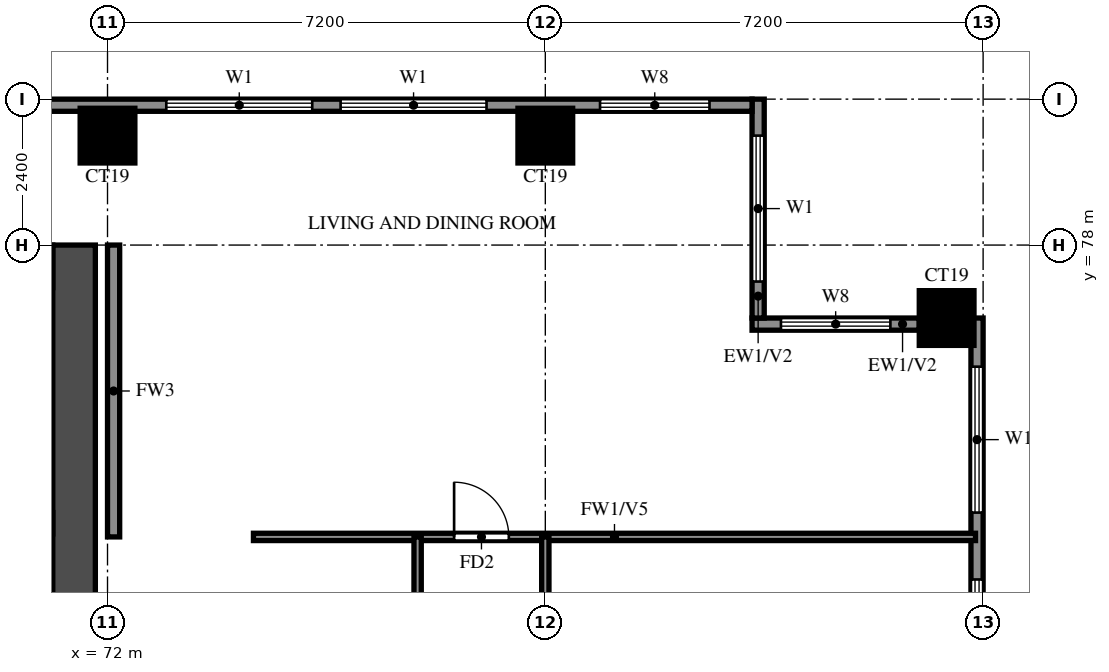
"""IFC4 building model, lengths in metres.
Left out: names, types, materials, properties, quantities, classifications, styles, units other than length and angle.
Written with IfcOpenShell. Run it as: python <this file> out.ifc"""

import sys

from ifc_helpers import new_model, si_unit, direction, frame, frame_2d, origin, origin_2d, place, context, subcontext, project, spatial, rectangle, extrude, source, transform, mapped, element, fill, save


model = new_model("IFC4")
c1 = context("Model", 3, precision=1e-05, world=origin(), true_north=direction((0.0, 1.0)))
c2 = subcontext(c1, "Body", "Model", "MODEL_VIEW")
j1 = project(units=[si_unit("LENGTHUNIT", "METRE"), si_unit("PLANEANGLEUNIT", "RADIAN")], contexts=[c1])
p1 = place(None, origin())
s1 = spatial("IfcSite", under=j1, at=p1, CompositionType="ELEMENT")
p2 = place(p1, origin())
s2 = spatial("IfcBuilding", under=s1, at=p2, CompositionType="ELEMENT")
p3 = place(p2, frame((0.0, 0.0, 127.0)))
s3 = spatial("IfcBuildingStorey", under=s2, at=p3, CompositionType="ELEMENT", Elevation=127.0)
m1 = source(origin(), c2, "Body", "SweptSolid", [
    extrude(rectangle(XDim=0.9, YDim=0.9, at=origin_2d()), origin(), (0.0, 0.0, 1.0), 3.2),
])
for number, where, z_axis, x_axis in (
    (1, (85.8, 76.8, 0.0), (0.0, 0.0, 1.0), (1.0, 0.0, 0.0)),
    (2, (72.0, 79.8, 0.0), (0.0, 0.0, 1.0), (1.0, 0.0, 0.0)),
    (3, (79.2, 79.8, 0.0), (0.0, 0.0, 1.0), (1.0, 0.0, 0.0)),
):
    element("IfcColumn", number, at=place(p3, frame(where, z_axis=z_axis, x_axis=x_axis)), inside=s3, PredefinedType="COLUMN", context=c2, shape_type="MappedRepresentation", body=[
        mapped(m1, transform((0.0, 0.0, 0.0))),
    ])
p4 = place(p3, frame((71.45, 66.1, 0.0), z_axis=(0.0, 0.0, 1.0), x_axis=(0.0, 1.0, 0.0)))
e4 = element("IfcWall", 4, at=p4, inside=s3, PredefinedType="SHEAR", context=c2, shape_type="SweptSolid", body=[
    extrude(rectangle(XDim=11.9, YDim=0.7, at=frame_2d((5.95, 0.0))), origin(), (0.0, 0.0, 1.0), 3.2),
])
p5 = place(p3, frame((29.7, 77.65, 0.0), z_axis=(0.0, 0.0, 1.0), x_axis=(1.0, 0.0, 0.0)))
e5 = element("IfcWall", 5, at=p5, inside=s3, PredefinedType="SHEAR", context=c2, shape_type="SweptSolid", body=[
    extrude(rectangle(XDim=41.4, YDim=0.7, at=frame_2d((20.7, 0.0))), origin(), (0.0, 0.0, 1.0), 3.2),
])
p6 = place(p3, frame((86.3, 48.2, 0.0), z_axis=(0.0, 0.0, 1.0), x_axis=(0.0, 1.0, 0.0)))
e6 = element("IfcWall", 6, at=p6, inside=s3, PredefinedType="SOLIDWALL", context=c2, shape_type="SweptSolid", body=[
    extrude(rectangle(XDim=28.6, YDim=0.2, at=frame_2d((14.3, 0.0))), origin(), (0.0, 0.0, 1.0), 3.2),
])
p7 = place(p6, frame((11.5, 0.0, 0.0)))
e7 = element("IfcOpeningElement", 7, at=p7, cuts=e6, PredefinedType="OPENING", context=c2, shape_type="SweptSolid", body=[
    extrude(rectangle(XDim=1.8, YDim=2.4, at=frame_2d((0.9, 1.2))), frame((0.0, 0.11, 0.0), z_axis=(0.0, -1.0, 0.0), x_axis=(1.0, 0.0, 0.0)), (0.0, 0.0, 1.0), 0.22),
])
p8 = place(p6, frame((0.767, 0.0, 0.6)))
e8 = element("IfcOpeningElement", 8, at=p8, cuts=e6, PredefinedType="OPENING", context=c2, shape_type="SweptSolid", body=[
    extrude(rectangle(XDim=2.4, YDim=2.4, at=frame_2d((1.2, 1.2))), frame((0.0, 0.11, 0.0), z_axis=(0.0, -1.0, 0.0), x_axis=(1.0, 0.0, 0.0)), (0.0, 0.0, 1.0), 0.22),
])
p9 = place(p6, frame((3.633, 0.0, 0.6)))
e9 = element("IfcOpeningElement", 9, at=p9, cuts=e6, PredefinedType="OPENING", context=c2, shape_type="SweptSolid", body=[
    extrude(rectangle(XDim=2.4, YDim=2.4, at=frame_2d((1.2, 1.2))), frame((0.0, 0.11, 0.0), z_axis=(0.0, -1.0, 0.0), x_axis=(1.0, 0.0, 0.0)), (0.0, 0.0, 1.0), 0.22),
])
p10 = place(p6, frame((7.8, 0.0, 0.6)))
e10 = element("IfcOpeningElement", 10, at=p10, cuts=e6, PredefinedType="OPENING", context=c2, shape_type="SweptSolid", body=[
    extrude(rectangle(XDim=1.2, YDim=2.4, at=frame_2d((0.6, 1.2))), frame((0.0, 0.11, 0.0), z_axis=(0.0, -1.0, 0.0), x_axis=(1.0, 0.0, 0.0)), (0.0, 0.0, 1.0), 0.22),
])
p11 = place(p6, frame((14.85, 0.0, 0.6)))
e11 = element("IfcOpeningElement", 11, at=p11, cuts=e6, PredefinedType="OPENING", context=c2, shape_type="SweptSolid", body=[
    extrude(rectangle(XDim=0.9, YDim=2.4, at=frame_2d((0.45, 1.2))), frame((0.0, 0.11, 0.0), z_axis=(0.0, -1.0, 0.0), x_axis=(1.0, 0.0, 0.0)), (0.0, 0.0, 1.0), 0.22),
])
p12 = place(p6, frame((16.75, 0.0, 0.6)))
e12 = element("IfcOpeningElement", 12, at=p12, cuts=e6, PredefinedType="OPENING", context=c2, shape_type="SweptSolid", body=[
    extrude(rectangle(XDim=0.9, YDim=2.4, at=frame_2d((0.45, 1.2))), frame((0.0, 0.11, 0.0), z_axis=(0.0, -1.0, 0.0), x_axis=(1.0, 0.0, 0.0)), (0.0, 0.0, 1.0), 0.22),
])
p13 = place(p6, frame((18.2, 0.0, 0.6)))
e13 = element("IfcOpeningElement", 13, at=p13, cuts=e6, PredefinedType="OPENING", context=c2, shape_type="SweptSolid", body=[
    extrude(rectangle(XDim=2.4, YDim=2.4, at=frame_2d((1.2, 1.2))), frame((0.0, 0.11, 0.0), z_axis=(0.0, -1.0, 0.0), x_axis=(1.0, 0.0, 0.0)), (0.0, 0.0, 1.0), 0.22),
])
p14 = place(p6, frame((22.5, 0.0, 0.6)))
e14 = element("IfcOpeningElement", 14, at=p14, cuts=e6, PredefinedType="OPENING", context=c2, shape_type="SweptSolid", body=[
    extrude(rectangle(XDim=1.8, YDim=2.4, at=frame_2d((0.9, 1.2))), frame((0.0, 0.11, 0.0), z_axis=(0.0, -1.0, 0.0), x_axis=(1.0, 0.0, 0.0)), (0.0, 0.0, 1.0), 0.22),
])
p15 = place(p6, frame((25.4, 0.0, 0.6)))
e15 = element("IfcOpeningElement", 15, at=p15, cuts=e6, PredefinedType="OPENING", context=c2, shape_type="SweptSolid", body=[
    extrude(rectangle(XDim=2.4, YDim=2.4, at=frame_2d((1.2, 1.2))), frame((0.0, 0.11, 0.0), z_axis=(0.0, -1.0, 0.0), x_axis=(1.0, 0.0, 0.0)), (0.0, 0.0, 1.0), 0.22),
])
p16 = place(p3, frame((85.35, 76.7, 0.0), z_axis=(0.0, 0.0, 1.0), x_axis=(-1.0, 0.0, 0.0)))
e16 = element("IfcWall", 16, at=p16, inside=s3, PredefinedType="SOLIDWALL", context=c2, shape_type="SweptSolid", body=[
    extrude(rectangle(XDim=2.75, YDim=0.2, at=frame_2d((1.375, 0.0))), origin(), (0.0, 0.0, 1.0), 3.2),
])
p17 = place(p16, frame((0.475, 0.0, 0.6)))
e17 = element("IfcOpeningElement", 17, at=p17, cuts=e16, PredefinedType="OPENING", context=c2, shape_type="SweptSolid", body=[
    extrude(rectangle(XDim=1.8, YDim=2.4, at=frame_2d((0.9, 1.2))), frame((0.0, 0.11, 0.0), z_axis=(0.0, -1.0, 0.0), x_axis=(1.0, 0.0, 0.0)), (0.0, 0.0, 1.0), 0.22),
])
p18 = place(p3, frame((82.7, 76.8, 0.0), z_axis=(0.0, 0.0, 1.0), x_axis=(0.0, 1.0, 0.0)))
e18 = element("IfcWall", 18, at=p18, inside=s3, PredefinedType="SOLIDWALL", context=c2, shape_type="SweptSolid", body=[
    extrude(rectangle(XDim=3.6, YDim=0.2, at=frame_2d((1.8, 0.0))), origin(), (0.0, 0.0, 1.0), 3.2),
])
p19 = place(p18, frame((0.6, 0.0, 0.6)))
e19 = element("IfcOpeningElement", 19, at=p19, cuts=e18, PredefinedType="OPENING", context=c2, shape_type="SweptSolid", body=[
    extrude(rectangle(XDim=2.4, YDim=2.4, at=frame_2d((1.2, 1.2))), frame((0.0, 0.11, 0.0), z_axis=(0.0, -1.0, 0.0), x_axis=(1.0, 0.0, 0.0)), (0.0, 0.0, 1.0), 0.22),
])
p20 = place(p3, frame((82.6, 80.3, 0.0), z_axis=(0.0, 0.0, 1.0), x_axis=(-1.0, 0.0, 0.0)))
e20 = element("IfcWall", 20, at=p20, inside=s3, PredefinedType="SOLIDWALL", context=c2, shape_type="SweptSolid", body=[
    extrude(rectangle(XDim=53.8, YDim=0.2, at=frame_2d((26.9, 0.0))), origin(), (0.0, 0.0, 1.0), 3.2),
])
p21 = place(p20, frame((0.7, 0.0, 0.6)))
e21 = element("IfcOpeningElement", 21, at=p21, cuts=e20, PredefinedType="OPENING", context=c2, shape_type="SweptSolid", body=[
    extrude(rectangle(XDim=1.8, YDim=2.4, at=frame_2d((0.9, 1.2))), frame((0.0, 0.11, 0.0), z_axis=(0.0, -1.0, 0.0), x_axis=(1.0, 0.0, 0.0)), (0.0, 0.0, 1.0), 0.22),
])
p22 = place(p20, frame((4.367, 0.0, 0.6)))
e22 = element("IfcOpeningElement", 22, at=p22, cuts=e20, PredefinedType="OPENING", context=c2, shape_type="SweptSolid", body=[
    extrude(rectangle(XDim=2.4, YDim=2.4, at=frame_2d((1.2, 1.2))), frame((0.0, 0.11, 0.0), z_axis=(0.0, -1.0, 0.0), x_axis=(1.0, 0.0, 0.0)), (0.0, 0.0, 1.0), 0.22),
])
p23 = place(p20, frame((7.233, 0.0, 0.6)))
e23 = element("IfcOpeningElement", 23, at=p23, cuts=e20, PredefinedType="OPENING", context=c2, shape_type="SweptSolid", body=[
    extrude(rectangle(XDim=2.4, YDim=2.4, at=frame_2d((1.2, 1.2))), frame((0.0, 0.11, 0.0), z_axis=(0.0, -1.0, 0.0), x_axis=(1.0, 0.0, 0.0)), (0.0, 0.0, 1.0), 0.22),
])
p24 = place(p3, frame((72.1, 73.2, 0.0), z_axis=(0.0, 0.0, 1.0), x_axis=(0.0, 1.0, 0.0)))
e24 = element("IfcWall", 24, at=p24, inside=s3, PredefinedType="SOLIDWALL", context=c2, shape_type="SweptSolid", body=[
    extrude(rectangle(XDim=4.8, YDim=0.2, at=frame_2d((2.4, 0.0))), origin(), (0.0, 0.0, 1.0), 3.2),
])
p25 = place(p3, frame((74.4, 73.2, 0.0), z_axis=(0.0, 0.0, 1.0), x_axis=(1.0, 0.0, 0.0)))
e25 = element("IfcWall", 25, at=p25, inside=s3, PredefinedType="PARTITIONING", context=c2, shape_type="SweptSolid", body=[
    extrude(rectangle(XDim=11.875, YDim=0.12, at=frame_2d((5.938, 0.0))), origin(), (0.0, 0.0, 1.0), 2.3),
])
p26 = place(p25, frame((3.3, 0.0, 0.0)))
e26 = element("IfcOpeningElement", 26, at=p26, cuts=e25, PredefinedType="OPENING", context=c2, shape_type="SweptSolid", body=[
    extrude(rectangle(XDim=0.9, YDim=2.1, at=frame_2d((0.45, 1.05))), frame((0.0, 0.07, 0.0), z_axis=(0.0, -1.0, 0.0), x_axis=(1.0, 0.0, 0.0)), (0.0, 0.0, 1.0), 0.14),
])
p27 = place(p3, frame((77.1, 61.2, 0.0), z_axis=(0.0, 0.0, 1.0), x_axis=(0.0, 1.0, 0.0)))
e27 = element("IfcWall", 27, at=p27, inside=s3, PredefinedType="PARTITIONING", context=c2, shape_type="SweptSolid", body=[
    extrude(rectangle(XDim=12.0, YDim=0.12, at=frame_2d((6.0, 0.0))), origin(), (0.0, 0.0, 1.0), 3.2),
])
p28 = place(p27, frame((1.875, 0.0, 0.0)))
e28 = element("IfcOpeningElement", 28, at=p28, cuts=e27, PredefinedType="OPENING", context=c2, shape_type="SweptSolid", body=[
    extrude(rectangle(XDim=0.9, YDim=2.1, at=frame_2d((0.45, 1.05))), frame((0.0, 0.07, 0.0), z_axis=(0.0, -1.0, 0.0), x_axis=(1.0, 0.0, 0.0)), (0.0, 0.0, 1.0), 0.14),
])
p29 = place(p27, frame((5.5, 0.0, 0.0)))
e29 = element("IfcOpeningElement", 29, at=p29, cuts=e27, PredefinedType="OPENING", context=c2, shape_type="SweptSolid", body=[
    extrude(rectangle(XDim=0.8, YDim=2.1, at=frame_2d((0.4, 1.05))), frame((0.0, 0.07, 0.0), z_axis=(0.0, -1.0, 0.0), x_axis=(1.0, 0.0, 0.0)), (0.0, 0.0, 1.0), 0.14),
])
p30 = place(p27, frame((9.125, 0.0, 0.0)))
e30 = element("IfcOpeningElement", 30, at=p30, cuts=e27, PredefinedType="OPENING", context=c2, shape_type="SweptSolid", body=[
    extrude(rectangle(XDim=0.9, YDim=2.1, at=frame_2d((0.45, 1.05))), frame((0.0, 0.07, 0.0), z_axis=(0.0, -1.0, 0.0), x_axis=(1.0, 0.0, 0.0)), (0.0, 0.0, 1.0), 0.14),
])
p31 = place(p3, frame((79.2, 48.125, 0.0), z_axis=(0.0, 0.0, 1.0), x_axis=(0.0, 1.0, 0.0)))
e31 = element("IfcWall", 31, at=p31, inside=s3, PredefinedType="PARTITIONING", context=c2, shape_type="SweptSolid", body=[
    extrude(rectangle(XDim=25.075, YDim=0.12, at=frame_2d((12.538, 0.0))), origin(), (0.0, 0.0, 1.0), 3.2),
])
p32 = place(p31, frame((2.788, 0.0, 0.0)))
e32 = element("IfcOpeningElement", 32, at=p32, cuts=e31, PredefinedType="OPENING", context=c2, shape_type="SweptSolid", body=[
    extrude(rectangle(XDim=1.5, YDim=2.1, at=frame_2d((0.75, 1.05))), frame((0.0, 0.07, 0.0), z_axis=(0.0, -1.0, 0.0), x_axis=(1.0, 0.0, 0.0)), (0.0, 0.0, 1.0), 0.14),
])
p33 = place(p31, frame((8.425, 0.0, 0.0)))
e33 = element("IfcOpeningElement", 33, at=p33, cuts=e31, PredefinedType="OPENING", context=c2, shape_type="SweptSolid", body=[
    extrude(rectangle(XDim=0.9, YDim=2.1, at=frame_2d((0.45, 1.05))), frame((0.0, 0.07, 0.0), z_axis=(0.0, -1.0, 0.0), x_axis=(1.0, 0.0, 0.0)), (0.0, 0.0, 1.0), 0.14),
])
p34 = place(p31, frame((12.025, 0.0, 0.0)))
e34 = element("IfcOpeningElement", 34, at=p34, cuts=e31, PredefinedType="OPENING", context=c2, shape_type="SweptSolid", body=[
    extrude(rectangle(XDim=0.9, YDim=2.1, at=frame_2d((0.45, 1.05))), frame((0.0, 0.07, 0.0), z_axis=(0.0, -1.0, 0.0), x_axis=(1.0, 0.0, 0.0)), (0.0, 0.0, 1.0), 0.14),
])
p35 = place(p31, frame((15.625, 0.0, 0.0)))
e35 = element("IfcOpeningElement", 35, at=p35, cuts=e31, PredefinedType="OPENING", context=c2, shape_type="SweptSolid", body=[
    extrude(rectangle(XDim=0.9, YDim=2.1, at=frame_2d((0.45, 1.05))), frame((0.0, 0.07, 0.0), z_axis=(0.0, -1.0, 0.0), x_axis=(1.0, 0.0, 0.0)), (0.0, 0.0, 1.0), 0.14),
])
p36 = place(p31, frame((19.225, 0.0, 0.0)))
e36 = element("IfcOpeningElement", 36, at=p36, cuts=e31, PredefinedType="OPENING", context=c2, shape_type="SweptSolid", body=[
    extrude(rectangle(XDim=0.9, YDim=2.1, at=frame_2d((0.45, 1.05))), frame((0.0, 0.07, 0.0), z_axis=(0.0, -1.0, 0.0), x_axis=(1.0, 0.0, 0.0)), (0.0, 0.0, 1.0), 0.14),
])
p37 = place(p31, frame((22.825, 0.0, 0.0)))
e37 = element("IfcOpeningElement", 37, at=p37, cuts=e31, PredefinedType="OPENING", context=c2, shape_type="SweptSolid", body=[
    extrude(rectangle(XDim=0.9, YDim=2.1, at=frame_2d((0.45, 1.05))), frame((0.0, 0.07, 0.0), z_axis=(0.0, -1.0, 0.0), x_axis=(1.0, 0.0, 0.0)), (0.0, 0.0, 1.0), 0.14),
])
p38 = place(p14, origin())
e38 = element("IfcWindow", 38, at=p38, inside=s3, PartitioningType="DOUBLE_PANEL_VERTICAL", PredefinedType="WINDOW", context=c2, shape_type="SweptSolid", body=[
    extrude(rectangle(XDim=1.8, YDim=2.4, at=frame_2d((0.9, 1.2))), frame((0.0, 0.03, 0.0), z_axis=(0.0, -1.0, 0.0), x_axis=(1.0, 0.0, 0.0)), (0.0, 0.0, 1.0), 0.06),
])
fill(e14, e38)
p39 = place(p15, origin())
e39 = element("IfcWindow", 39, at=p39, inside=s3, PartitioningType="DOUBLE_PANEL_VERTICAL", PredefinedType="WINDOW", context=c2, shape_type="SweptSolid", body=[
    extrude(rectangle(XDim=2.4, YDim=2.4, at=frame_2d((1.2, 1.2))), frame((0.0, 0.03, 0.0), z_axis=(0.0, -1.0, 0.0), x_axis=(1.0, 0.0, 0.0)), (0.0, 0.0, 1.0), 0.06),
])
fill(e15, e39)
p40 = place(p17, origin())
e40 = element("IfcWindow", 40, at=p40, inside=s3, PartitioningType="DOUBLE_PANEL_VERTICAL", PredefinedType="WINDOW", context=c2, shape_type="SweptSolid", body=[
    extrude(rectangle(XDim=1.8, YDim=2.4, at=frame_2d((0.9, 1.2))), frame((0.0, 0.03, 0.0), z_axis=(0.0, -1.0, 0.0), x_axis=(1.0, 0.0, 0.0)), (0.0, 0.0, 1.0), 0.06),
])
fill(e17, e40)
p41 = place(p19, origin())
e41 = element("IfcWindow", 41, at=p41, inside=s3, PartitioningType="DOUBLE_PANEL_VERTICAL", PredefinedType="WINDOW", context=c2, shape_type="SweptSolid", body=[
    extrude(rectangle(XDim=2.4, YDim=2.4, at=frame_2d((1.2, 1.2))), frame((0.0, 0.03, 0.0), z_axis=(0.0, -1.0, 0.0), x_axis=(1.0, 0.0, 0.0)), (0.0, 0.0, 1.0), 0.06),
])
fill(e19, e41)
p42 = place(p21, origin())
e42 = element("IfcWindow", 42, at=p42, inside=s3, PartitioningType="DOUBLE_PANEL_VERTICAL", PredefinedType="WINDOW", context=c2, shape_type="SweptSolid", body=[
    extrude(rectangle(XDim=1.8, YDim=2.4, at=frame_2d((0.9, 1.2))), frame((0.0, 0.03, 0.0), z_axis=(0.0, -1.0, 0.0), x_axis=(1.0, 0.0, 0.0)), (0.0, 0.0, 1.0), 0.06),
])
fill(e21, e42)
p43 = place(p22, origin())
e43 = element("IfcWindow", 43, at=p43, inside=s3, PartitioningType="DOUBLE_PANEL_VERTICAL", PredefinedType="WINDOW", context=c2, shape_type="SweptSolid", body=[
    extrude(rectangle(XDim=2.4, YDim=2.4, at=frame_2d((1.2, 1.2))), frame((0.0, 0.03, 0.0), z_axis=(0.0, -1.0, 0.0), x_axis=(1.0, 0.0, 0.0)), (0.0, 0.0, 1.0), 0.06),
])
fill(e22, e43)
p44 = place(p23, origin())
e44 = element("IfcWindow", 44, at=p44, inside=s3, PartitioningType="DOUBLE_PANEL_VERTICAL", PredefinedType="WINDOW", context=c2, shape_type="SweptSolid", body=[
    extrude(rectangle(XDim=2.4, YDim=2.4, at=frame_2d((1.2, 1.2))), frame((0.0, 0.03, 0.0), z_axis=(0.0, -1.0, 0.0), x_axis=(1.0, 0.0, 0.0)), (0.0, 0.0, 1.0), 0.06),
])
fill(e23, e44)
p45 = place(p26, origin())
e45 = element("IfcDoor", 45, at=p45, inside=s3, OperationType="SINGLE_SWING_RIGHT", PredefinedType="DOOR", context=c2, shape_type="SweptSolid", body=[
    extrude(rectangle(XDim=0.9, YDim=2.1, at=frame_2d((0.45, 1.05))), frame((0.0, 0.025, 0.0), z_axis=(0.0, -1.0, 0.0), x_axis=(1.0, 0.0, 0.0)), (0.0, 0.0, 1.0), 0.05),
])
fill(e26, e45)
save(model, sys.argv[1])
